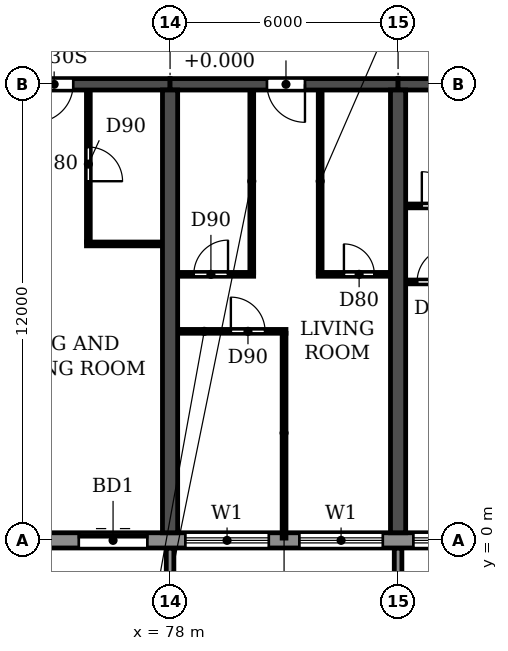
"""IFC4 building model, lengths in metres.
Left out: names, types, materials, properties, quantities, classifications, styles, units other than length and angle.
Written with IfcOpenShell. Run it as: python <this file> out.ifc"""

import sys

from ifc_helpers import new_model, si_unit, direction, frame, frame_2d, origin, place, context, subcontext, project, spatial, polyline, rectangle, outline, extrude, source, transform, mapped, element, fill, save


model = new_model("IFC4")
c1 = context("Model", 3, precision=1e-05, world=origin(), true_north=direction((0.0, 1.0)))
c2 = subcontext(c1, "Body", "Model", "MODEL_VIEW")
j1 = project(units=[si_unit("LENGTHUNIT", "METRE"), si_unit("PLANEANGLEUNIT", "RADIAN")], contexts=[c1])
p1 = place(None, origin())
s1 = spatial("IfcSite", under=j1, at=p1, CompositionType="ELEMENT")
p2 = place(p1, origin())
s2 = spatial("IfcBuilding", under=s1, at=p2, CompositionType="ELEMENT")
p3 = place(p2, frame((0.0, 0.0, 63.0)))
s3 = spatial("IfcBuildingStorey", under=s2, at=p3, CompositionType="ELEMENT", Elevation=63.0)
for number, where, z_axis, x_axis in (
    (1, (78.0, 0.2, 0.0), (0.0, 0.0, 1.0), (0.0, 1.0, 0.0)),
    (2, (84.0, 0.2, 0.0), (0.0, 0.0, 1.0), (0.0, 1.0, 0.0)),
):
    element("IfcWall", number, at=place(p3, frame(where, z_axis=z_axis, x_axis=x_axis)), inside=s3, PredefinedType="SHEAR", context=c2, shape_type="SweptSolid", body=[
        extrude(rectangle(XDim=11.65, YDim=0.4, at=frame_2d((5.825, 0.0))), origin(), (0.0, 0.0, 1.0), 2.95),
    ])
p4 = place(p3, frame((72.0, 12.0, 0.0), z_axis=(0.0, 0.0, 1.0), x_axis=(1.0, 0.0, 0.0)))
e3 = element("IfcWall", 3, at=p4, inside=s3, PredefinedType="SHEAR", context=c2, shape_type="SweptSolid", body=[
    extrude(rectangle(XDim=6.0, YDim=0.3, at=frame_2d((3.0, 0.0))), origin(), (0.0, 0.0, 1.0), 2.35),
])
p5 = place(p4, frame((2.45, 0.0, 0.0)))
e4 = element("IfcOpeningElement", 4, at=p5, cuts=e3, PredefinedType="OPENING", context=c2, shape_type="SweptSolid", body=[
    extrude(rectangle(XDim=1.0, YDim=2.1, at=frame_2d((0.5, 1.05))), frame((0.0, 0.16, 0.0), z_axis=(0.0, -1.0, 0.0), x_axis=(1.0, 0.0, 0.0)), (0.0, 0.0, 1.0), 0.32),
])
p6 = place(p3, frame((78.0, 12.0, 0.0), z_axis=(0.0, 0.0, 1.0), x_axis=(1.0, 0.0, 0.0)))
e5 = element("IfcWall", 5, at=p6, inside=s3, PredefinedType="SHEAR", context=c2, shape_type="SweptSolid", body=[
    extrude(rectangle(XDim=6.0, YDim=0.3, at=frame_2d((3.0, 0.0))), origin(), (0.0, 0.0, 1.0), 2.35),
])
p7 = place(p6, frame((2.55, 0.0, 0.0)))
e6 = element("IfcOpeningElement", 6, at=p7, cuts=e5, PredefinedType="OPENING", context=c2, shape_type="SweptSolid", body=[
    extrude(rectangle(XDim=1.0, YDim=2.1, at=frame_2d((0.5, 1.05))), frame((0.0, 0.16, 0.0), z_axis=(0.0, -1.0, 0.0), x_axis=(1.0, 0.0, 0.0)), (0.0, 0.0, 1.0), 0.32),
])
p8 = place(p3, frame((84.0, 12.0, 0.0), z_axis=(0.0, 0.0, 1.0), x_axis=(1.0, 0.0, 0.0)))
e7 = element("IfcWall", 7, at=p8, inside=s3, PredefinedType="SHEAR", context=c2, shape_type="SweptSolid", body=[
    extrude(rectangle(XDim=6.0, YDim=0.3, at=frame_2d((3.0, 0.0))), origin(), (0.0, 0.0, 1.0), 2.35),
])
p9 = place(p8, frame((2.55, 0.0, 0.0)))
e8 = element("IfcOpeningElement", 8, at=p9, cuts=e7, PredefinedType="OPENING", context=c2, shape_type="SweptSolid", body=[
    extrude(rectangle(XDim=1.0, YDim=2.1, at=frame_2d((0.5, 1.05))), frame((0.0, 0.16, 0.0), z_axis=(0.0, -1.0, 0.0), x_axis=(1.0, 0.0, 0.0)), (0.0, 0.0, 1.0), 0.32),
])
p10 = place(p3, frame((10.683, 0.0, 0.0), z_axis=(0.0, 0.0, 1.0), x_axis=(1.0, 0.0, 0.0)))
e9 = element("IfcWall", 9, at=p10, inside=s3, PredefinedType="STANDARD", context=c2, shape_type="SweptSolid", body=[
    extrude(rectangle(XDim=80.634, YDim=0.4, at=frame_2d((40.317, 0.0))), origin(), (0.0, 0.0, 1.0), 2.95),
])
p11 = place(p10, frame((1.717, 0.0, 0.9)))
e10 = element("IfcOpeningElement", 10, at=p11, cuts=e9, PredefinedType="OPENING", context=c2, shape_type="SweptSolid", body=[
    extrude(rectangle(XDim=2.2, YDim=1.5, at=frame_2d((1.1, 0.75))), frame((0.0, 0.21, 0.0), z_axis=(0.0, -1.0, 0.0), x_axis=(1.0, 0.0, 0.0)), (0.0, 0.0, 1.0), 0.42),
])
p12 = place(p10, frame((4.917, 0.0, 0.0)))
e11 = element("IfcOpeningElement", 11, at=p12, cuts=e9, PredefinedType="OPENING", context=c2, shape_type="SweptSolid", body=[
    extrude(rectangle(XDim=1.8, YDim=2.4, at=frame_2d((0.9, 1.2))), frame((0.0, 0.21, 0.0), z_axis=(0.0, -1.0, 0.0), x_axis=(1.0, 0.0, 0.0)), (0.0, 0.0, 1.0), 0.42),
])
p13 = place(p10, frame((7.717, 0.0, 0.9)))
e12 = element("IfcOpeningElement", 12, at=p13, cuts=e9, PredefinedType="OPENING", context=c2, shape_type="SweptSolid", body=[
    extrude(rectangle(XDim=2.2, YDim=1.5, at=frame_2d((1.1, 0.75))), frame((0.0, 0.21, 0.0), z_axis=(0.0, -1.0, 0.0), x_axis=(1.0, 0.0, 0.0)), (0.0, 0.0, 1.0), 0.42),
])
p14 = place(p10, frame((10.717, 0.0, 0.9)))
e13 = element("IfcOpeningElement", 13, at=p14, cuts=e9, PredefinedType="OPENING", context=c2, shape_type="SweptSolid", body=[
    extrude(rectangle(XDim=2.2, YDim=1.5, at=frame_2d((1.1, 0.75))), frame((0.0, 0.21, 0.0), z_axis=(0.0, -1.0, 0.0), x_axis=(1.0, 0.0, 0.0)), (0.0, 0.0, 1.0), 0.42),
])
p15 = place(p10, frame((13.717, 0.0, 0.9)))
e14 = element("IfcOpeningElement", 14, at=p15, cuts=e9, PredefinedType="OPENING", context=c2, shape_type="SweptSolid", body=[
    extrude(rectangle(XDim=2.2, YDim=1.5, at=frame_2d((1.1, 0.75))), frame((0.0, 0.21, 0.0), z_axis=(0.0, -1.0, 0.0), x_axis=(1.0, 0.0, 0.0)), (0.0, 0.0, 1.0), 0.42),
])
p16 = place(p10, frame((16.917, 0.0, 0.0)))
e15 = element("IfcOpeningElement", 15, at=p16, cuts=e9, PredefinedType="OPENING", context=c2, shape_type="SweptSolid", body=[
    extrude(rectangle(XDim=1.8, YDim=2.4, at=frame_2d((0.9, 1.2))), frame((0.0, 0.21, 0.0), z_axis=(0.0, -1.0, 0.0), x_axis=(1.0, 0.0, 0.0)), (0.0, 0.0, 1.0), 0.42),
])
p17 = place(p10, frame((19.717, 0.0, 0.9)))
e16 = element("IfcOpeningElement", 16, at=p17, cuts=e9, PredefinedType="OPENING", context=c2, shape_type="SweptSolid", body=[
    extrude(rectangle(XDim=2.2, YDim=1.5, at=frame_2d((1.1, 0.75))), frame((0.0, 0.21, 0.0), z_axis=(0.0, -1.0, 0.0), x_axis=(1.0, 0.0, 0.0)), (0.0, 0.0, 1.0), 0.42),
])
p18 = place(p10, frame((22.717, 0.0, 0.9)))
e17 = element("IfcOpeningElement", 17, at=p18, cuts=e9, PredefinedType="OPENING", context=c2, shape_type="SweptSolid", body=[
    extrude(rectangle(XDim=2.2, YDim=1.5, at=frame_2d((1.1, 0.75))), frame((0.0, 0.21, 0.0), z_axis=(0.0, -1.0, 0.0), x_axis=(1.0, 0.0, 0.0)), (0.0, 0.0, 1.0), 0.42),
])
p19 = place(p10, frame((25.917, 0.0, 0.0)))
e18 = element("IfcOpeningElement", 18, at=p19, cuts=e9, PredefinedType="OPENING", context=c2, shape_type="SweptSolid", body=[
    extrude(rectangle(XDim=1.8, YDim=2.4, at=frame_2d((0.9, 1.2))), frame((0.0, 0.21, 0.0), z_axis=(0.0, -1.0, 0.0), x_axis=(1.0, 0.0, 0.0)), (0.0, 0.0, 1.0), 0.42),
])
p20 = place(p10, frame((28.717, 0.0, 0.9)))
e19 = element("IfcOpeningElement", 19, at=p20, cuts=e9, PredefinedType="OPENING", context=c2, shape_type="SweptSolid", body=[
    extrude(rectangle(XDim=2.2, YDim=1.5, at=frame_2d((1.1, 0.75))), frame((0.0, 0.21, 0.0), z_axis=(0.0, -1.0, 0.0), x_axis=(1.0, 0.0, 0.0)), (0.0, 0.0, 1.0), 0.42),
])
p21 = place(p10, frame((31.717, 0.0, 0.9)))
e20 = element("IfcOpeningElement", 20, at=p21, cuts=e9, PredefinedType="OPENING", context=c2, shape_type="SweptSolid", body=[
    extrude(rectangle(XDim=2.2, YDim=1.5, at=frame_2d((1.1, 0.75))), frame((0.0, 0.21, 0.0), z_axis=(0.0, -1.0, 0.0), x_axis=(1.0, 0.0, 0.0)), (0.0, 0.0, 1.0), 0.42),
])
p22 = place(p10, frame((34.717, 0.0, 0.9)))
e21 = element("IfcOpeningElement", 21, at=p22, cuts=e9, PredefinedType="OPENING", context=c2, shape_type="SweptSolid", body=[
    extrude(rectangle(XDim=2.2, YDim=1.5, at=frame_2d((1.1, 0.75))), frame((0.0, 0.21, 0.0), z_axis=(0.0, -1.0, 0.0), x_axis=(1.0, 0.0, 0.0)), (0.0, 0.0, 1.0), 0.42),
])
p23 = place(p10, frame((37.717, 0.0, 0.9)))
e22 = element("IfcOpeningElement", 22, at=p23, cuts=e9, PredefinedType="OPENING", context=c2, shape_type="SweptSolid", body=[
    extrude(rectangle(XDim=2.2, YDim=1.5, at=frame_2d((1.1, 0.75))), frame((0.0, 0.21, 0.0), z_axis=(0.0, -1.0, 0.0), x_axis=(1.0, 0.0, 0.0)), (0.0, 0.0, 1.0), 0.42),
])
p24 = place(p10, frame((40.917, 0.0, 0.0)))
e23 = element("IfcOpeningElement", 23, at=p24, cuts=e9, PredefinedType="OPENING", context=c2, shape_type="SweptSolid", body=[
    extrude(rectangle(XDim=1.8, YDim=2.4, at=frame_2d((0.9, 1.2))), frame((0.0, 0.21, 0.0), z_axis=(0.0, -1.0, 0.0), x_axis=(1.0, 0.0, 0.0)), (0.0, 0.0, 1.0), 0.42),
])
p25 = place(p10, frame((43.717, 0.0, 0.9)))
e24 = element("IfcOpeningElement", 24, at=p25, cuts=e9, PredefinedType="OPENING", context=c2, shape_type="SweptSolid", body=[
    extrude(rectangle(XDim=2.2, YDim=1.5, at=frame_2d((1.1, 0.75))), frame((0.0, 0.21, 0.0), z_axis=(0.0, -1.0, 0.0), x_axis=(1.0, 0.0, 0.0)), (0.0, 0.0, 1.0), 0.42),
])
p26 = place(p10, frame((46.717, 0.0, 0.9)))
e25 = element("IfcOpeningElement", 25, at=p26, cuts=e9, PredefinedType="OPENING", context=c2, shape_type="SweptSolid", body=[
    extrude(rectangle(XDim=2.2, YDim=1.5, at=frame_2d((1.1, 0.75))), frame((0.0, 0.21, 0.0), z_axis=(0.0, -1.0, 0.0), x_axis=(1.0, 0.0, 0.0)), (0.0, 0.0, 1.0), 0.42),
])
p27 = place(p10, frame((49.717, 0.0, 0.9)))
e26 = element("IfcOpeningElement", 26, at=p27, cuts=e9, PredefinedType="OPENING", context=c2, shape_type="SweptSolid", body=[
    extrude(rectangle(XDim=2.2, YDim=1.5, at=frame_2d((1.1, 0.75))), frame((0.0, 0.21, 0.0), z_axis=(0.0, -1.0, 0.0), x_axis=(1.0, 0.0, 0.0)), (0.0, 0.0, 1.0), 0.42),
])
p28 = place(p10, frame((52.717, 0.0, 0.9)))
e27 = element("IfcOpeningElement", 27, at=p28, cuts=e9, PredefinedType="OPENING", context=c2, shape_type="SweptSolid", body=[
    extrude(rectangle(XDim=2.2, YDim=1.5, at=frame_2d((1.1, 0.75))), frame((0.0, 0.21, 0.0), z_axis=(0.0, -1.0, 0.0), x_axis=(1.0, 0.0, 0.0)), (0.0, 0.0, 1.0), 0.42),
])
p29 = place(p10, frame((55.717, 0.0, 0.9)))
e28 = element("IfcOpeningElement", 28, at=p29, cuts=e9, PredefinedType="OPENING", context=c2, shape_type="SweptSolid", body=[
    extrude(rectangle(XDim=2.2, YDim=1.5, at=frame_2d((1.1, 0.75))), frame((0.0, 0.21, 0.0), z_axis=(0.0, -1.0, 0.0), x_axis=(1.0, 0.0, 0.0)), (0.0, 0.0, 1.0), 0.42),
])
p30 = place(p10, frame((58.717, 0.0, 0.9)))
e29 = element("IfcOpeningElement", 29, at=p30, cuts=e9, PredefinedType="OPENING", context=c2, shape_type="SweptSolid", body=[
    extrude(rectangle(XDim=2.2, YDim=1.5, at=frame_2d((1.1, 0.75))), frame((0.0, 0.21, 0.0), z_axis=(0.0, -1.0, 0.0), x_axis=(1.0, 0.0, 0.0)), (0.0, 0.0, 1.0), 0.42),
])
p31 = place(p10, frame((61.717, 0.0, 0.9)))
e30 = element("IfcOpeningElement", 30, at=p31, cuts=e9, PredefinedType="OPENING", context=c2, shape_type="SweptSolid", body=[
    extrude(rectangle(XDim=2.2, YDim=1.5, at=frame_2d((1.1, 0.75))), frame((0.0, 0.21, 0.0), z_axis=(0.0, -1.0, 0.0), x_axis=(1.0, 0.0, 0.0)), (0.0, 0.0, 1.0), 0.42),
])
p32 = place(p10, frame((64.917, 0.0, 0.0)))
e31 = element("IfcOpeningElement", 31, at=p32, cuts=e9, PredefinedType="OPENING", context=c2, shape_type="SweptSolid", body=[
    extrude(rectangle(XDim=1.8, YDim=2.4, at=frame_2d((0.9, 1.2))), frame((0.0, 0.21, 0.0), z_axis=(0.0, -1.0, 0.0), x_axis=(1.0, 0.0, 0.0)), (0.0, 0.0, 1.0), 0.42),
])
p33 = place(p10, frame((67.717, 0.0, 0.9)))
e32 = element("IfcOpeningElement", 32, at=p33, cuts=e9, PredefinedType="OPENING", context=c2, shape_type="SweptSolid", body=[
    extrude(rectangle(XDim=2.2, YDim=1.5, at=frame_2d((1.1, 0.75))), frame((0.0, 0.21, 0.0), z_axis=(0.0, -1.0, 0.0), x_axis=(1.0, 0.0, 0.0)), (0.0, 0.0, 1.0), 0.42),
])
p34 = place(p10, frame((70.717, 0.0, 0.9)))
e33 = element("IfcOpeningElement", 33, at=p34, cuts=e9, PredefinedType="OPENING", context=c2, shape_type="SweptSolid", body=[
    extrude(rectangle(XDim=2.2, YDim=1.5, at=frame_2d((1.1, 0.75))), frame((0.0, 0.21, 0.0), z_axis=(0.0, -1.0, 0.0), x_axis=(1.0, 0.0, 0.0)), (0.0, 0.0, 1.0), 0.42),
])
p35 = place(p10, frame((73.717, 0.0, 0.9)))
e34 = element("IfcOpeningElement", 34, at=p35, cuts=e9, PredefinedType="OPENING", context=c2, shape_type="SweptSolid", body=[
    extrude(rectangle(XDim=2.2, YDim=1.5, at=frame_2d((1.1, 0.75))), frame((0.0, 0.21, 0.0), z_axis=(0.0, -1.0, 0.0), x_axis=(1.0, 0.0, 0.0)), (0.0, 0.0, 1.0), 0.42),
])
p36 = place(p10, frame((76.917, 0.0, 0.0)))
e35 = element("IfcOpeningElement", 35, at=p36, cuts=e9, PredefinedType="OPENING", context=c2, shape_type="SweptSolid", body=[
    extrude(rectangle(XDim=1.8, YDim=2.4, at=frame_2d((0.9, 1.2))), frame((0.0, 0.21, 0.0), z_axis=(0.0, -1.0, 0.0), x_axis=(1.0, 0.0, 0.0)), (0.0, 0.0, 1.0), 0.42),
])
m1 = source(origin(), c2, "Body", "SweptSolid", [
    extrude(outline(polyline([(0.0, 0.0), (0.2, 0.0), (0.2, 1.65), (0.0, 1.65), (0.0, 0.0)])), origin(), (0.0, 0.0, 1.0), 3.1),
])
for number, where in (
    (36, (77.9, -1.85, 0.0)),
    (37, (83.9, -1.85, 0.0)),
):
    element("IfcWall", number, at=place(p3, frame(where)), inside=s3, PredefinedType="STANDARD", context=c2, shape_type="MappedRepresentation", body=[
        mapped(m1, transform((0.0, 0.0, 0.0))),
    ])
p37 = place(p3, frame((78.21, 5.5, 0.0), z_axis=(0.0, 0.0, 1.0), x_axis=(1.0, 0.0, 0.0)))
e38 = element("IfcWall", 38, at=p37, inside=s3, PredefinedType="PARTITIONING", context=c2, shape_type="SweptSolid", body=[
    extrude(rectangle(XDim=2.84, YDim=0.1, at=frame_2d((1.42, 0.0))), origin(), (0.0, 0.0, 1.0), 2.95),
])
p38 = place(p37, frame((1.39, 0.0, 0.0)))
e39 = element("IfcOpeningElement", 39, at=p38, cuts=e38, PredefinedType="OPENING", context=c2, shape_type="SweptSolid", body=[
    extrude(rectangle(XDim=0.9, YDim=2.1, at=frame_2d((0.45, 1.05))), frame((0.0, 0.06, 0.0), z_axis=(0.0, -1.0, 0.0), x_axis=(1.0, 0.0, 0.0)), (0.0, 0.0, 1.0), 0.12),
])
p39 = place(p3, frame((84.21, 6.8, 0.0), z_axis=(0.0, 0.0, 1.0), x_axis=(1.0, 0.0, 0.0)))
e40 = element("IfcWall", 40, at=p39, inside=s3, PredefinedType="PARTITIONING", context=c2, shape_type="SweptSolid", body=[
    extrude(rectangle(XDim=2.84, YDim=0.1, at=frame_2d((1.42, 0.0))), origin(), (0.0, 0.0, 1.0), 2.95),
])
p40 = place(p39, frame((0.29, 0.0, 0.0)))
e41 = element("IfcOpeningElement", 41, at=p40, cuts=e40, PredefinedType="OPENING", context=c2, shape_type="SweptSolid", body=[
    extrude(rectangle(XDim=0.9, YDim=2.1, at=frame_2d((0.45, 1.05))), frame((0.0, 0.06, 0.0), z_axis=(0.0, -1.0, 0.0), x_axis=(1.0, 0.0, 0.0)), (0.0, 0.0, 1.0), 0.12),
])
p41 = place(p3, frame((78.21, 7.0, 0.0), z_axis=(0.0, 0.0, 1.0), x_axis=(1.0, 0.0, 0.0)))
e42 = element("IfcWall", 42, at=p41, inside=s3, PredefinedType="PARTITIONING", context=c2, shape_type="SweptSolid", body=[
    extrude(rectangle(XDim=1.99, YDim=0.1, at=frame_2d((0.995, 0.0))), origin(), (0.0, 0.0, 1.0), 2.95),
])
p42 = place(p41, frame((0.415, 0.0, 0.0)))
e43 = element("IfcOpeningElement", 43, at=p42, cuts=e42, PredefinedType="OPENING", context=c2, shape_type="SweptSolid", body=[
    extrude(rectangle(XDim=0.9, YDim=2.1, at=frame_2d((0.45, 1.05))), frame((0.0, 0.06, 0.0), z_axis=(0.0, -1.0, 0.0), x_axis=(1.0, 0.0, 0.0)), (0.0, 0.0, 1.0), 0.12),
])
p43 = place(p3, frame((81.9, 7.0, 0.0), z_axis=(0.0, 0.0, 1.0), x_axis=(1.0, 0.0, 0.0)))
e44 = element("IfcWall", 44, at=p43, inside=s3, PredefinedType="PARTITIONING", context=c2, shape_type="SweptSolid", body=[
    extrude(rectangle(XDim=1.89, YDim=0.1, at=frame_2d((0.945, 0.0))), origin(), (0.0, 0.0, 1.0), 2.95),
])
p44 = place(p43, frame((0.675, 0.0, 0.0)))
e45 = element("IfcOpeningElement", 45, at=p44, cuts=e44, PredefinedType="OPENING", context=c2, shape_type="SweptSolid", body=[
    extrude(rectangle(XDim=0.8, YDim=2.1, at=frame_2d((0.4, 1.05))), frame((0.0, 0.06, 0.0), z_axis=(0.0, -1.0, 0.0), x_axis=(1.0, 0.0, 0.0)), (0.0, 0.0, 1.0), 0.12),
])
p45 = place(p3, frame((75.8, 7.8, 0.0), z_axis=(0.0, 0.0, 1.0), x_axis=(1.0, 0.0, 0.0)))
e46 = element("IfcWall", 46, at=p45, inside=s3, PredefinedType="PARTITIONING", context=c2, shape_type="SweptSolid", body=[
    extrude(rectangle(XDim=1.99, YDim=0.1, at=frame_2d((0.995, 0.0))), origin(), (0.0, 0.0, 1.0), 2.95),
])
p46 = place(p3, frame((84.21, 8.8, 0.0), z_axis=(0.0, 0.0, 1.0), x_axis=(1.0, 0.0, 0.0)))
e47 = element("IfcWall", 47, at=p46, inside=s3, PredefinedType="PARTITIONING", context=c2, shape_type="SweptSolid", body=[
    extrude(rectangle(XDim=1.99, YDim=0.1, at=frame_2d((0.995, 0.0))), origin(), (0.0, 0.0, 1.0), 2.95),
])
p47 = place(p46, frame((0.415, 0.0, 0.0)))
e48 = element("IfcOpeningElement", 48, at=p47, cuts=e47, PredefinedType="OPENING", context=c2, shape_type="SweptSolid", body=[
    extrude(rectangle(XDim=0.9, YDim=2.1, at=frame_2d((0.45, 1.05))), frame((0.0, 0.06, 0.0), z_axis=(0.0, -1.0, 0.0), x_axis=(1.0, 0.0, 0.0)), (0.0, 0.0, 1.0), 0.12),
])
p48 = place(p3, frame((75.85, 7.85, 0.0), z_axis=(0.0, 0.0, 1.0), x_axis=(0.0, 1.0, 0.0)))
e49 = element("IfcWall", 49, at=p48, inside=s3, PredefinedType="PARTITIONING", context=c2, shape_type="SweptSolid", body=[
    extrude(rectangle(XDim=3.99, YDim=0.1, at=frame_2d((1.995, 0.0))), origin(), (0.0, 0.0, 1.0), 2.95),
])
p49 = place(p48, frame((1.6, 0.0, 0.0)))
e50 = element("IfcOpeningElement", 50, at=p49, cuts=e49, PredefinedType="OPENING", context=c2, shape_type="SweptSolid", body=[
    extrude(rectangle(XDim=0.9, YDim=2.1, at=frame_2d((0.45, 1.05))), frame((0.0, 0.06, 0.0), z_axis=(0.0, -1.0, 0.0), x_axis=(1.0, 0.0, 0.0)), (0.0, 0.0, 1.0), 0.12),
])
p50 = place(p3, frame((80.15, 7.05, 0.0), z_axis=(0.0, 0.0, 1.0), x_axis=(0.0, 1.0, 0.0)))
e51 = element("IfcWall", 51, at=p50, inside=s3, PredefinedType="PARTITIONING", context=c2, shape_type="SweptSolid", body=[
    extrude(rectangle(XDim=4.79, YDim=0.1, at=frame_2d((2.395, 0.0))), origin(), (0.0, 0.0, 1.0), 2.95),
])
p51 = place(p3, frame((81.0, 0.06, 0.0), z_axis=(0.0, 0.0, 1.0), x_axis=(0.0, 1.0, 0.0)))
e52 = element("IfcWall", 52, at=p51, inside=s3, PredefinedType="PARTITIONING", context=c2, shape_type="SweptSolid", body=[
    extrude(rectangle(XDim=5.39, YDim=0.1, at=frame_2d((2.695, 0.0))), origin(), (0.0, 0.0, 1.0), 2.95),
])
p52 = place(p3, frame((81.95, 7.05, 0.0), z_axis=(0.0, 0.0, 1.0), x_axis=(0.0, 1.0, 0.0)))
e53 = element("IfcWall", 53, at=p52, inside=s3, PredefinedType="PARTITIONING", context=c2, shape_type="SweptSolid", body=[
    extrude(rectangle(XDim=4.79, YDim=0.1, at=frame_2d((2.395, 0.0))), origin(), (0.0, 0.0, 1.0), 2.95),
])
p53 = place(p32, origin())
e54 = element("IfcDoor", 54, at=p53, inside=s3, OperationType="DOUBLE_DOOR_SLIDING", PredefinedType="DOOR", context=c2, shape_type="SweptSolid", body=[
    extrude(rectangle(XDim=1.8, YDim=2.4, at=frame_2d((0.9, 1.2))), frame((0.0, 0.025, 0.0), z_axis=(0.0, -1.0, 0.0), x_axis=(1.0, 0.0, 0.0)), (0.0, 0.0, 1.0), 0.05),
])
fill(e31, e54)
p54 = place(p33, origin())
e55 = element("IfcWindow", 55, at=p54, inside=s3, PartitioningType="DOUBLE_PANEL_HORIZONTAL", PredefinedType="WINDOW", context=c2, shape_type="SweptSolid", body=[
    extrude(rectangle(XDim=2.2, YDim=1.5, at=frame_2d((1.1, 0.75))), frame((0.0, 0.03, 0.0), z_axis=(0.0, -1.0, 0.0), x_axis=(1.0, 0.0, 0.0)), (0.0, 0.0, 1.0), 0.06),
])
fill(e32, e55)
p55 = place(p34, origin())
e56 = element("IfcWindow", 56, at=p55, inside=s3, PartitioningType="DOUBLE_PANEL_HORIZONTAL", PredefinedType="WINDOW", context=c2, shape_type="SweptSolid", body=[
    extrude(rectangle(XDim=2.2, YDim=1.5, at=frame_2d((1.1, 0.75))), frame((0.0, 0.03, 0.0), z_axis=(0.0, -1.0, 0.0), x_axis=(1.0, 0.0, 0.0)), (0.0, 0.0, 1.0), 0.06),
])
fill(e33, e56)
p56 = place(p35, origin())
e57 = element("IfcWindow", 57, at=p56, inside=s3, PartitioningType="DOUBLE_PANEL_HORIZONTAL", PredefinedType="WINDOW", context=c2, shape_type="SweptSolid", body=[
    extrude(rectangle(XDim=2.2, YDim=1.5, at=frame_2d((1.1, 0.75))), frame((0.0, 0.03, 0.0), z_axis=(0.0, -1.0, 0.0), x_axis=(1.0, 0.0, 0.0)), (0.0, 0.0, 1.0), 0.06),
])
fill(e34, e57)
p57 = place(p5, frame((1.0, 0.0, 0.0), z_axis=(0.0, 0.0, 1.0), x_axis=(-1.0, 0.0, 0.0)))
e58 = element("IfcDoor", 58, at=p57, inside=s3, OperationType="SINGLE_SWING_RIGHT", PredefinedType="DOOR", context=c2, shape_type="SweptSolid", body=[
    extrude(rectangle(XDim=1.0, YDim=2.1, at=frame_2d((0.5, 1.05))), frame((0.0, 0.025, 0.0), z_axis=(0.0, -1.0, 0.0), x_axis=(1.0, 0.0, 0.0)), (0.0, 0.0, 1.0), 0.05),
])
fill(e4, e58)
p58 = place(p49, frame((0.9, 0.0, 0.0), z_axis=(0.0, 0.0, 1.0), x_axis=(-1.0, 0.0, 0.0)))
e59 = element("IfcDoor", 59, at=p58, inside=s3, OperationType="SINGLE_SWING_RIGHT", PredefinedType="DOOR", context=c2, shape_type="SweptSolid", body=[
    extrude(rectangle(XDim=0.9, YDim=2.1, at=frame_2d((0.45, 1.05))), frame((0.0, 0.025, 0.0), z_axis=(0.0, -1.0, 0.0), x_axis=(1.0, 0.0, 0.0)), (0.0, 0.0, 1.0), 0.05),
])
fill(e50, e59)
p59 = place(p42, origin())
e60 = element("IfcDoor", 60, at=p59, inside=s3, OperationType="SINGLE_SWING_RIGHT", PredefinedType="DOOR", context=c2, shape_type="SweptSolid", body=[
    extrude(rectangle(XDim=0.9, YDim=2.1, at=frame_2d((0.45, 1.05))), frame((0.0, 0.025, 0.0), z_axis=(0.0, -1.0, 0.0), x_axis=(1.0, 0.0, 0.0)), (0.0, 0.0, 1.0), 0.05),
])
fill(e43, e60)
p60 = place(p38, origin())
e61 = element("IfcDoor", 61, at=p60, inside=s3, OperationType="SINGLE_SWING_LEFT", PredefinedType="DOOR", context=c2, shape_type="SweptSolid", body=[
    extrude(rectangle(XDim=0.9, YDim=2.1, at=frame_2d((0.45, 1.05))), frame((0.0, 0.025, 0.0), z_axis=(0.0, -1.0, 0.0), x_axis=(1.0, 0.0, 0.0)), (0.0, 0.0, 1.0), 0.05),
])
fill(e39, e61)
p61 = place(p7, frame((1.0, 0.0, 0.0), z_axis=(0.0, 0.0, 1.0), x_axis=(-1.0, 0.0, 0.0)))
e62 = element("IfcDoor", 62, at=p61, inside=s3, OperationType="SINGLE_SWING_LEFT", PredefinedType="DOOR", context=c2, shape_type="SweptSolid", body=[
    extrude(rectangle(XDim=1.0, YDim=2.1, at=frame_2d((0.5, 1.05))), frame((0.0, 0.025, 0.0), z_axis=(0.0, -1.0, 0.0), x_axis=(1.0, 0.0, 0.0)), (0.0, 0.0, 1.0), 0.05),
])
fill(e6, e62)
p62 = place(p44, origin())
e63 = element("IfcDoor", 63, at=p62, inside=s3, OperationType="SINGLE_SWING_LEFT", PredefinedType="DOOR", context=c2, shape_type="SweptSolid", body=[
    extrude(rectangle(XDim=0.8, YDim=2.1, at=frame_2d((0.4, 1.05))), frame((0.0, 0.025, 0.0), z_axis=(0.0, -1.0, 0.0), x_axis=(1.0, 0.0, 0.0)), (0.0, 0.0, 1.0), 0.05),
])
fill(e45, e63)
p63 = place(p40, origin())
e64 = element("IfcDoor", 64, at=p63, inside=s3, OperationType="SINGLE_SWING_RIGHT", PredefinedType="DOOR", context=c2, shape_type="SweptSolid", body=[
    extrude(rectangle(XDim=0.9, YDim=2.1, at=frame_2d((0.45, 1.05))), frame((0.0, 0.025, 0.0), z_axis=(0.0, -1.0, 0.0), x_axis=(1.0, 0.0, 0.0)), (0.0, 0.0, 1.0), 0.05),
])
fill(e41, e64)
p64 = place(p47, origin())
e65 = element("IfcDoor", 65, at=p64, inside=s3, OperationType="SINGLE_SWING_LEFT", PredefinedType="DOOR", context=c2, shape_type="SweptSolid", body=[
    extrude(rectangle(XDim=0.9, YDim=2.1, at=frame_2d((0.45, 1.05))), frame((0.0, 0.025, 0.0), z_axis=(0.0, -1.0, 0.0), x_axis=(1.0, 0.0, 0.0)), (0.0, 0.0, 1.0), 0.05),
])
fill(e48, e65)
save(model, sys.argv[1])
